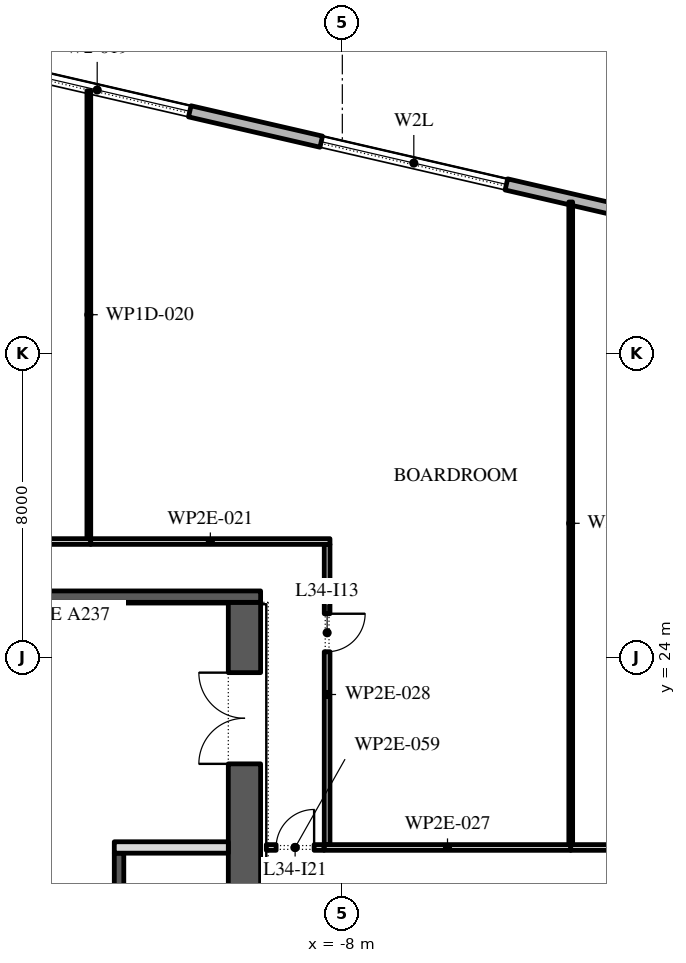
"""IFC4 building model, lengths in metres.
Left out: names, types, materials, properties, quantities, classifications, styles, units other than length and angle.
Written with IfcOpenShell. Run it as: python <this file> out.ifc"""

import sys

from ifc_helpers import new_model, si_unit, direction, frame, frame_2d, origin, place, context, subcontext, project, spatial, rectangle, extrude, element, fill, save


model = new_model("IFC4")
c1 = context("Model", 3, precision=1e-05, world=origin(), true_north=direction((0.0, 1.0)))
c2 = subcontext(c1, "Body", "Model", "MODEL_VIEW")
j1 = project(units=[si_unit("LENGTHUNIT", "METRE"), si_unit("PLANEANGLEUNIT", "RADIAN")], contexts=[c1])
p1 = place(None, origin())
s1 = spatial("IfcSite", under=j1, at=p1, CompositionType="ELEMENT")
p2 = place(p1, origin())
s2 = spatial("IfcBuilding", under=s1, at=p2, CompositionType="ELEMENT")
p3 = place(p2, frame((0.0, 0.0, 156.0)))
s3 = spatial("IfcBuildingStorey", under=s2, at=p3, CompositionType="ELEMENT", Elevation=156.0)
p4 = place(p3, frame((31.078, 28.421, 0.0), z_axis=(0.0, 0.0, 1.0), x_axis=(-0.974370456532, 0.224949357493, 0.0)))
e1 = element("IfcWall", 1, at=p4, inside=s3, PredefinedType="STANDARD", context=c2, shape_type="SweptSolid", body=[
    extrude(rectangle(XDim=51.0, YDim=0.3, at=frame_2d((25.5, 0.0))), origin(), (0.0, 0.0, 1.0), 3.9),
])
p5 = place(p4, frame((1.625, 0.0, 0.45)))
e2 = element("IfcOpeningElement", 2, at=p5, cuts=e1, PredefinedType="OPENING", context=c2, shape_type="SweptSolid", body=[
    extrude(rectangle(XDim=5.0, YDim=2.725, at=frame_2d((2.5, 1.363))), frame((0.0, 0.16, 0.0), z_axis=(0.0, -1.0, 0.0), x_axis=(1.0, 0.0, 0.0)), (0.0, 0.0, 1.0), 0.32),
])
p6 = place(p4, frame((10.025, 0.0, 0.45)))
e3 = element("IfcOpeningElement", 3, at=p6, cuts=e1, PredefinedType="OPENING", context=c2, shape_type="SweptSolid", body=[
    extrude(rectangle(XDim=5.0, YDim=2.65, at=frame_2d((2.5, 1.325))), frame((0.0, 0.16, 0.0), z_axis=(0.0, -1.0, 0.0), x_axis=(1.0, 0.0, 0.0)), (0.0, 0.0, 1.0), 0.32),
])
p7 = place(p4, frame((18.575, 0.0, 0.45)))
e4 = element("IfcOpeningElement", 4, at=p7, cuts=e1, PredefinedType="OPENING", context=c2, shape_type="SweptSolid", body=[
    extrude(rectangle(XDim=5.0, YDim=2.575, at=frame_2d((2.5, 1.288))), frame((0.0, 0.16, 0.0), z_axis=(0.0, -1.0, 0.0), x_axis=(1.0, 0.0, 0.0)), (0.0, 0.0, 1.0), 0.32),
])
p8 = place(p4, frame((28.425, 0.0, 0.0)))
e5 = element("IfcOpeningElement", 5, at=p8, cuts=e1, PredefinedType="OPENING", context=c2, shape_type="SweptSolid", body=[
    extrude(rectangle(XDim=2.4, YDim=3.5, at=frame_2d((1.2, 1.75))), frame((0.0, 0.16, 0.0), z_axis=(0.0, -1.0, 0.0), x_axis=(1.0, 0.0, 0.0)), (0.0, 0.0, 1.0), 0.32),
])
p9 = place(p4, frame((35.675, 0.0, 0.45)))
e6 = element("IfcOpeningElement", 6, at=p9, cuts=e1, PredefinedType="OPENING", context=c2, shape_type="SweptSolid", body=[
    extrude(rectangle(XDim=5.0, YDim=2.4, at=frame_2d((2.5, 1.2))), frame((0.0, 0.16, 0.0), z_axis=(0.0, -1.0, 0.0), x_axis=(1.0, 0.0, 0.0)), (0.0, 0.0, 1.0), 0.32),
])
p10 = place(p4, frame((44.225, 0.0, 0.45)))
e7 = element("IfcOpeningElement", 7, at=p10, cuts=e1, PredefinedType="OPENING", context=c2, shape_type="SweptSolid", body=[
    extrude(rectangle(XDim=5.0, YDim=3.25, at=frame_2d((2.5, 1.625))), frame((0.0, 0.16, 0.0), z_axis=(0.0, -1.0, 0.0), x_axis=(1.0, 0.0, 0.0)), (0.0, 0.0, 1.0), 0.32),
])
p11 = place(p3, frame((-10.575, -2.45, 0.0), z_axis=(0.0, 0.0, 1.0), x_axis=(0.0, 1.0, 0.0)))
e8 = element("IfcWall", 8, at=p11, inside=s3, PredefinedType="SHEAR", context=c2, shape_type="SweptSolid", body=[
    extrude(rectangle(XDim=27.9, YDim=0.85, at=frame_2d((13.95, 0.0))), origin(), (0.0, 0.0, 1.0), 3.9),
])
p12 = place(p11, frame((23.65, 0.0, 0.0)))
e9 = element("IfcOpeningElement", 9, at=p12, cuts=e8, PredefinedType="OPENING", context=c2, shape_type="SweptSolid", body=[
    extrude(rectangle(XDim=2.4, YDim=2.1, at=frame_2d((1.2, 1.05))), frame((0.0, 0.435, 0.0), z_axis=(0.0, -1.0, 0.0), x_axis=(1.0, 0.0, 0.0)), (0.0, 0.0, 1.0), 0.87),
])
p13 = place(p11, frame((1.087, 0.0, 0.0)))
e10 = element("IfcOpeningElement", 10, at=p13, cuts=e8, PredefinedType="OPENING", context=c2, shape_type="SweptSolid", body=[
    extrude(rectangle(XDim=0.9, YDim=2.1, at=frame_2d((0.45, 1.05))), frame((0.0, 0.435, 0.0), z_axis=(0.0, -1.0, 0.0), x_axis=(1.0, 0.0, 0.0)), (0.0, 0.0, 1.0), 0.87),
])
p14 = place(p11, frame((4.262, 0.0, 0.0)))
e11 = element("IfcOpeningElement", 11, at=p14, cuts=e8, PredefinedType="OPENING", context=c2, shape_type="SweptSolid", body=[
    extrude(rectangle(XDim=1.0, YDim=2.1, at=frame_2d((0.5, 1.05))), frame((0.0, 0.435, 0.0), z_axis=(0.0, -1.0, 0.0), x_axis=(1.0, 0.0, 0.0)), (0.0, 0.0, 1.0), 0.87),
])
p15 = place(p3, frame((-21.85, 25.6, 0.0), z_axis=(0.0, 0.0, 1.0), x_axis=(1.0, 0.0, 0.0)))
e12 = element("IfcWall", 12, at=p15, inside=s3, PredefinedType="SHEAR", context=c2, shape_type="SweptSolid", body=[
    extrude(rectangle(XDim=11.7, YDim=0.3, at=frame_2d((5.85, 0.0))), origin(), (0.0, 0.0, 1.0), 3.9),
])
p16 = place(p3, frame((-13.875, -2.45, 0.0), z_axis=(0.0, 0.0, 1.0), x_axis=(0.0, 1.0, 0.0)))
e13 = element("IfcWall", 13, at=p16, inside=s3, PredefinedType="SHEAR", context=c2, shape_type="SweptSolid", body=[
    extrude(rectangle(XDim=21.3, YDim=0.25, at=frame_2d((10.65, 0.0))), origin(), (0.0, 0.0, 1.0), 3.9),
])
p17 = place(p16, frame((10.196, 0.0, 0.0)))
e14 = element("IfcOpeningElement", 14, at=p17, cuts=e13, PredefinedType="OPENING", context=c2, shape_type="SweptSolid", body=[
    extrude(rectangle(XDim=0.9, YDim=2.1, at=frame_2d((0.45, 1.05))), frame((0.0, 0.135, 0.0), z_axis=(0.0, -1.0, 0.0), x_axis=(1.0, 0.0, 0.0)), (0.0, 0.0, 1.0), 0.27),
])
p18 = place(p16, frame((16.475, 0.0, 0.0)))
e15 = element("IfcOpeningElement", 15, at=p18, cuts=e13, PredefinedType="OPENING", context=c2, shape_type="SweptSolid", body=[
    extrude(rectangle(XDim=0.9, YDim=2.1, at=frame_2d((0.45, 1.05))), frame((0.0, 0.135, 0.0), z_axis=(0.0, -1.0, 0.0), x_axis=(1.0, 0.0, 0.0)), (0.0, 0.0, 1.0), 0.27),
])
p19 = place(p16, frame((6.971, 0.0, 0.0)))
e16 = element("IfcOpeningElement", 16, at=p19, cuts=e13, PredefinedType="OPENING", context=c2, shape_type="SweptSolid", body=[
    extrude(rectangle(XDim=1.1, YDim=2.1, at=frame_2d((0.55, 1.05))), frame((0.0, 0.135, 0.0), z_axis=(0.0, -1.0, 0.0), x_axis=(1.0, 0.0, 0.0)), (0.0, 0.0, 1.0), 0.27),
])
p20 = place(p3, frame((-14.0, 19.0, 0.0), z_axis=(0.0, 0.0, 1.0), x_axis=(1.0, 0.0, 0.0)))
e17 = element("IfcWall", 17, at=p20, inside=s3, PredefinedType="PARTITIONING", context=c2, shape_type="SweptSolid", body=[
    extrude(rectangle(XDim=3.0, YDim=0.3, at=frame_2d((1.5, 0.0))), origin(), (0.0, 0.0, 1.0), 3.9),
])
p21 = place(p3, frame((-23.515, 27.05, 0.0), z_axis=(0.0, 0.0, 1.0), x_axis=(1.0, 0.0, 0.0)))
e18 = element("IfcWall", 18, at=p21, inside=s3, PredefinedType="PARTITIONING", context=c2, shape_type="SweptSolid", body=[
    extrude(rectangle(XDim=8.895, YDim=0.15, at=frame_2d((4.447, 0.0))), origin(), (0.0, 0.0, 1.0), 3.9),
])
p22 = place(p21, frame((4.695, 0.0, 0.0)))
e19 = element("IfcOpeningElement", 19, at=p22, cuts=e18, PredefinedType="OPENING", context=c2, shape_type="SweptSolid", body=[
    extrude(rectangle(XDim=1.0, YDim=2.1, at=frame_2d((0.5, 1.05))), frame((0.0, 0.085, 0.0), z_axis=(0.0, -1.0, 0.0), x_axis=(1.0, 0.0, 0.0)), (0.0, 0.0, 1.0), 0.17),
])
p23 = place(p3, frame((-14.67, 27.125, 0.0), z_axis=(0.0, 0.0, 1.0), x_axis=(0.0, 1.0, 0.0)))
e20 = element("IfcWall", 20, at=p23, inside=s3, PredefinedType="PARTITIONING", context=c2, shape_type="SweptSolid", body=[
    extrude(rectangle(XDim=11.786, YDim=0.1, at=frame_2d((5.893, 0.0))), origin(), (0.0, 0.0, 1.0), 3.9),
])
p24 = place(p3, frame((-14.62, 27.05, 0.0), z_axis=(0.0, 0.0, 1.0), x_axis=(1.0, 0.0, 0.0)))
e21 = element("IfcWall", 21, at=p24, inside=s3, PredefinedType="PARTITIONING", context=c2, shape_type="SweptSolid", body=[
    extrude(rectangle(XDim=6.295, YDim=0.15, at=frame_2d((3.147, 0.0))), origin(), (0.0, 0.0, 1.0), 3.9),
])
p25 = place(p3, frame((-8.475, 19.0, 0.0), z_axis=(0.0, 0.0, 1.0), x_axis=(1.0, 0.0, 0.0)))
e22 = element("IfcWall", 22, at=p25, inside=s3, PredefinedType="PARTITIONING", context=c2, shape_type="SweptSolid", body=[
    extrude(rectangle(XDim=6.485, YDim=0.15, at=frame_2d((3.243, 0.0))), origin(), (0.0, 0.0, 1.0), 3.9),
])
p26 = place(p3, frame((-8.4, 26.975, 0.0), z_axis=(0.0, 0.0, 1.0), x_axis=(0.0, -1.0, 0.0)))
e23 = element("IfcWall", 23, at=p26, inside=s3, PredefinedType="PARTITIONING", context=c2, shape_type="SweptSolid", body=[
    extrude(rectangle(XDim=7.9, YDim=0.15, at=frame_2d((3.95, 0.0))), origin(), (0.0, 0.0, 1.0), 3.9),
])
p27 = place(p26, frame((1.825, 0.0, 0.0)))
e24 = element("IfcOpeningElement", 24, at=p27, cuts=e23, PredefinedType="OPENING", context=c2, shape_type="SweptSolid", body=[
    extrude(rectangle(XDim=1.0, YDim=2.1, at=frame_2d((0.5, 1.05))), frame((0.0, 0.085, 0.0), z_axis=(0.0, -1.0, 0.0), x_axis=(1.0, 0.0, 0.0)), (0.0, 0.0, 1.0), 0.17),
])
p28 = place(p3, frame((-1.99, 19.075, 0.0), z_axis=(0.0, 0.0, 1.0), x_axis=(0.0, 1.0, 0.0)))
e25 = element("IfcWall", 25, at=p28, inside=s3, PredefinedType="PARTITIONING", context=c2, shape_type="SweptSolid", body=[
    extrude(rectangle(XDim=16.909, YDim=0.1, at=frame_2d((8.455, 0.0))), origin(), (0.0, 0.0, 1.0), 3.9),
])
p29 = place(p3, frame((-1.99, 19.0, 0.0), z_axis=(0.0, 0.0, 1.0), x_axis=(1.0, 0.0, 0.0)))
e26 = element("IfcWall", 26, at=p29, inside=s3, PredefinedType="PARTITIONING", context=c2, shape_type="SweptSolid", body=[
    extrude(rectangle(XDim=10.465, YDim=0.15, at=frame_2d((5.232, 0.0))), origin(), (0.0, 0.0, 1.0), 3.9),
])
p30 = place(p29, frame((2.74, 0.0, 0.0)))
e27 = element("IfcOpeningElement", 27, at=p30, cuts=e26, PredefinedType="OPENING", context=c2, shape_type="SweptSolid", body=[
    extrude(rectangle(XDim=1.0, YDim=2.1, at=frame_2d((0.5, 1.05))), frame((0.0, 0.085, 0.0), z_axis=(0.0, -1.0, 0.0), x_axis=(1.0, 0.0, 0.0)), (0.0, 0.0, 1.0), 0.17),
])
p31 = place(p3, frame((-10.0, 19.0, 0.0), z_axis=(0.0, 0.0, 1.0), x_axis=(1.0, 0.0, 0.0)))
e28 = element("IfcWall", 28, at=p31, inside=s3, PredefinedType="PARTITIONING", context=c2, shape_type="SweptSolid", body=[
    extrude(rectangle(XDim=1.515, YDim=0.15, at=frame_2d((0.757, 0.0))), origin(), (0.0, 0.0, 1.0), 3.9),
])
p32 = place(p31, frame((0.258, 0.0, 0.0)))
e29 = element("IfcOpeningElement", 29, at=p32, cuts=e28, PredefinedType="OPENING", context=c2, shape_type="SweptSolid", body=[
    extrude(rectangle(XDim=1.0, YDim=2.1, at=frame_2d((0.5, 1.05))), frame((0.0, 0.085, 0.0), z_axis=(0.0, -1.0, 0.0), x_axis=(1.0, 0.0, 0.0)), (0.0, 0.0, 1.0), 0.17),
])
p33 = place(p9, origin())
e30 = element("IfcWindow", 30, at=p33, inside=s3, PartitioningType="DOUBLE_PANEL_VERTICAL", PredefinedType="WINDOW", context=c2, shape_type="SweptSolid", body=[
    extrude(rectangle(XDim=5.0, YDim=2.4, at=frame_2d((2.5, 1.2))), frame((0.0, 0.03, 0.0), z_axis=(0.0, -1.0, 0.0), x_axis=(1.0, 0.0, 0.0)), (0.0, 0.0, 1.0), 0.06),
])
fill(e6, e30)
p34 = place(p10, origin())
e31 = element("IfcWindow", 31, at=p34, inside=s3, PartitioningType="DOUBLE_PANEL_VERTICAL", PredefinedType="WINDOW", context=c2, shape_type="SweptSolid", body=[
    extrude(rectangle(XDim=5.0, YDim=3.25, at=frame_2d((2.5, 1.625))), frame((0.0, 0.03, 0.0), z_axis=(0.0, -1.0, 0.0), x_axis=(1.0, 0.0, 0.0)), (0.0, 0.0, 1.0), 0.06),
])
fill(e7, e31)
p35 = place(p12, origin())
e32 = element("IfcDoor", 32, at=p35, inside=s3, OperationType="DOUBLE_DOOR_SINGLE_SWING", PredefinedType="DOOR", context=c2, shape_type="SweptSolid", body=[
    extrude(rectangle(XDim=2.4, YDim=2.1, at=frame_2d((1.2, 1.05))), frame((0.0, 0.025, 0.0), z_axis=(0.0, -1.0, 0.0), x_axis=(1.0, 0.0, 0.0)), (0.0, 0.0, 1.0), 0.05),
])
fill(e9, e32)
p36 = place(p27, origin())
e33 = element("IfcDoor", 33, at=p36, inside=s3, OperationType="SINGLE_SWING_RIGHT", PredefinedType="DOOR", context=c2, shape_type="SweptSolid", body=[
    extrude(rectangle(XDim=1.0, YDim=2.1, at=frame_2d((0.5, 1.05))), frame((0.0, 0.025, 0.0), z_axis=(0.0, -1.0, 0.0), x_axis=(1.0, 0.0, 0.0)), (0.0, 0.0, 1.0), 0.05),
])
fill(e24, e33)
p37 = place(p32, origin())
e34 = element("IfcDoor", 34, at=p37, inside=s3, OperationType="SINGLE_SWING_LEFT", PredefinedType="DOOR", context=c2, shape_type="SweptSolid", body=[
    extrude(rectangle(XDim=1.0, YDim=2.1, at=frame_2d((0.5, 1.05))), frame((0.0, 0.025, 0.0), z_axis=(0.0, -1.0, 0.0), x_axis=(1.0, 0.0, 0.0)), (0.0, 0.0, 1.0), 0.05),
])
fill(e29, e34)
save(model, sys.argv[1])
